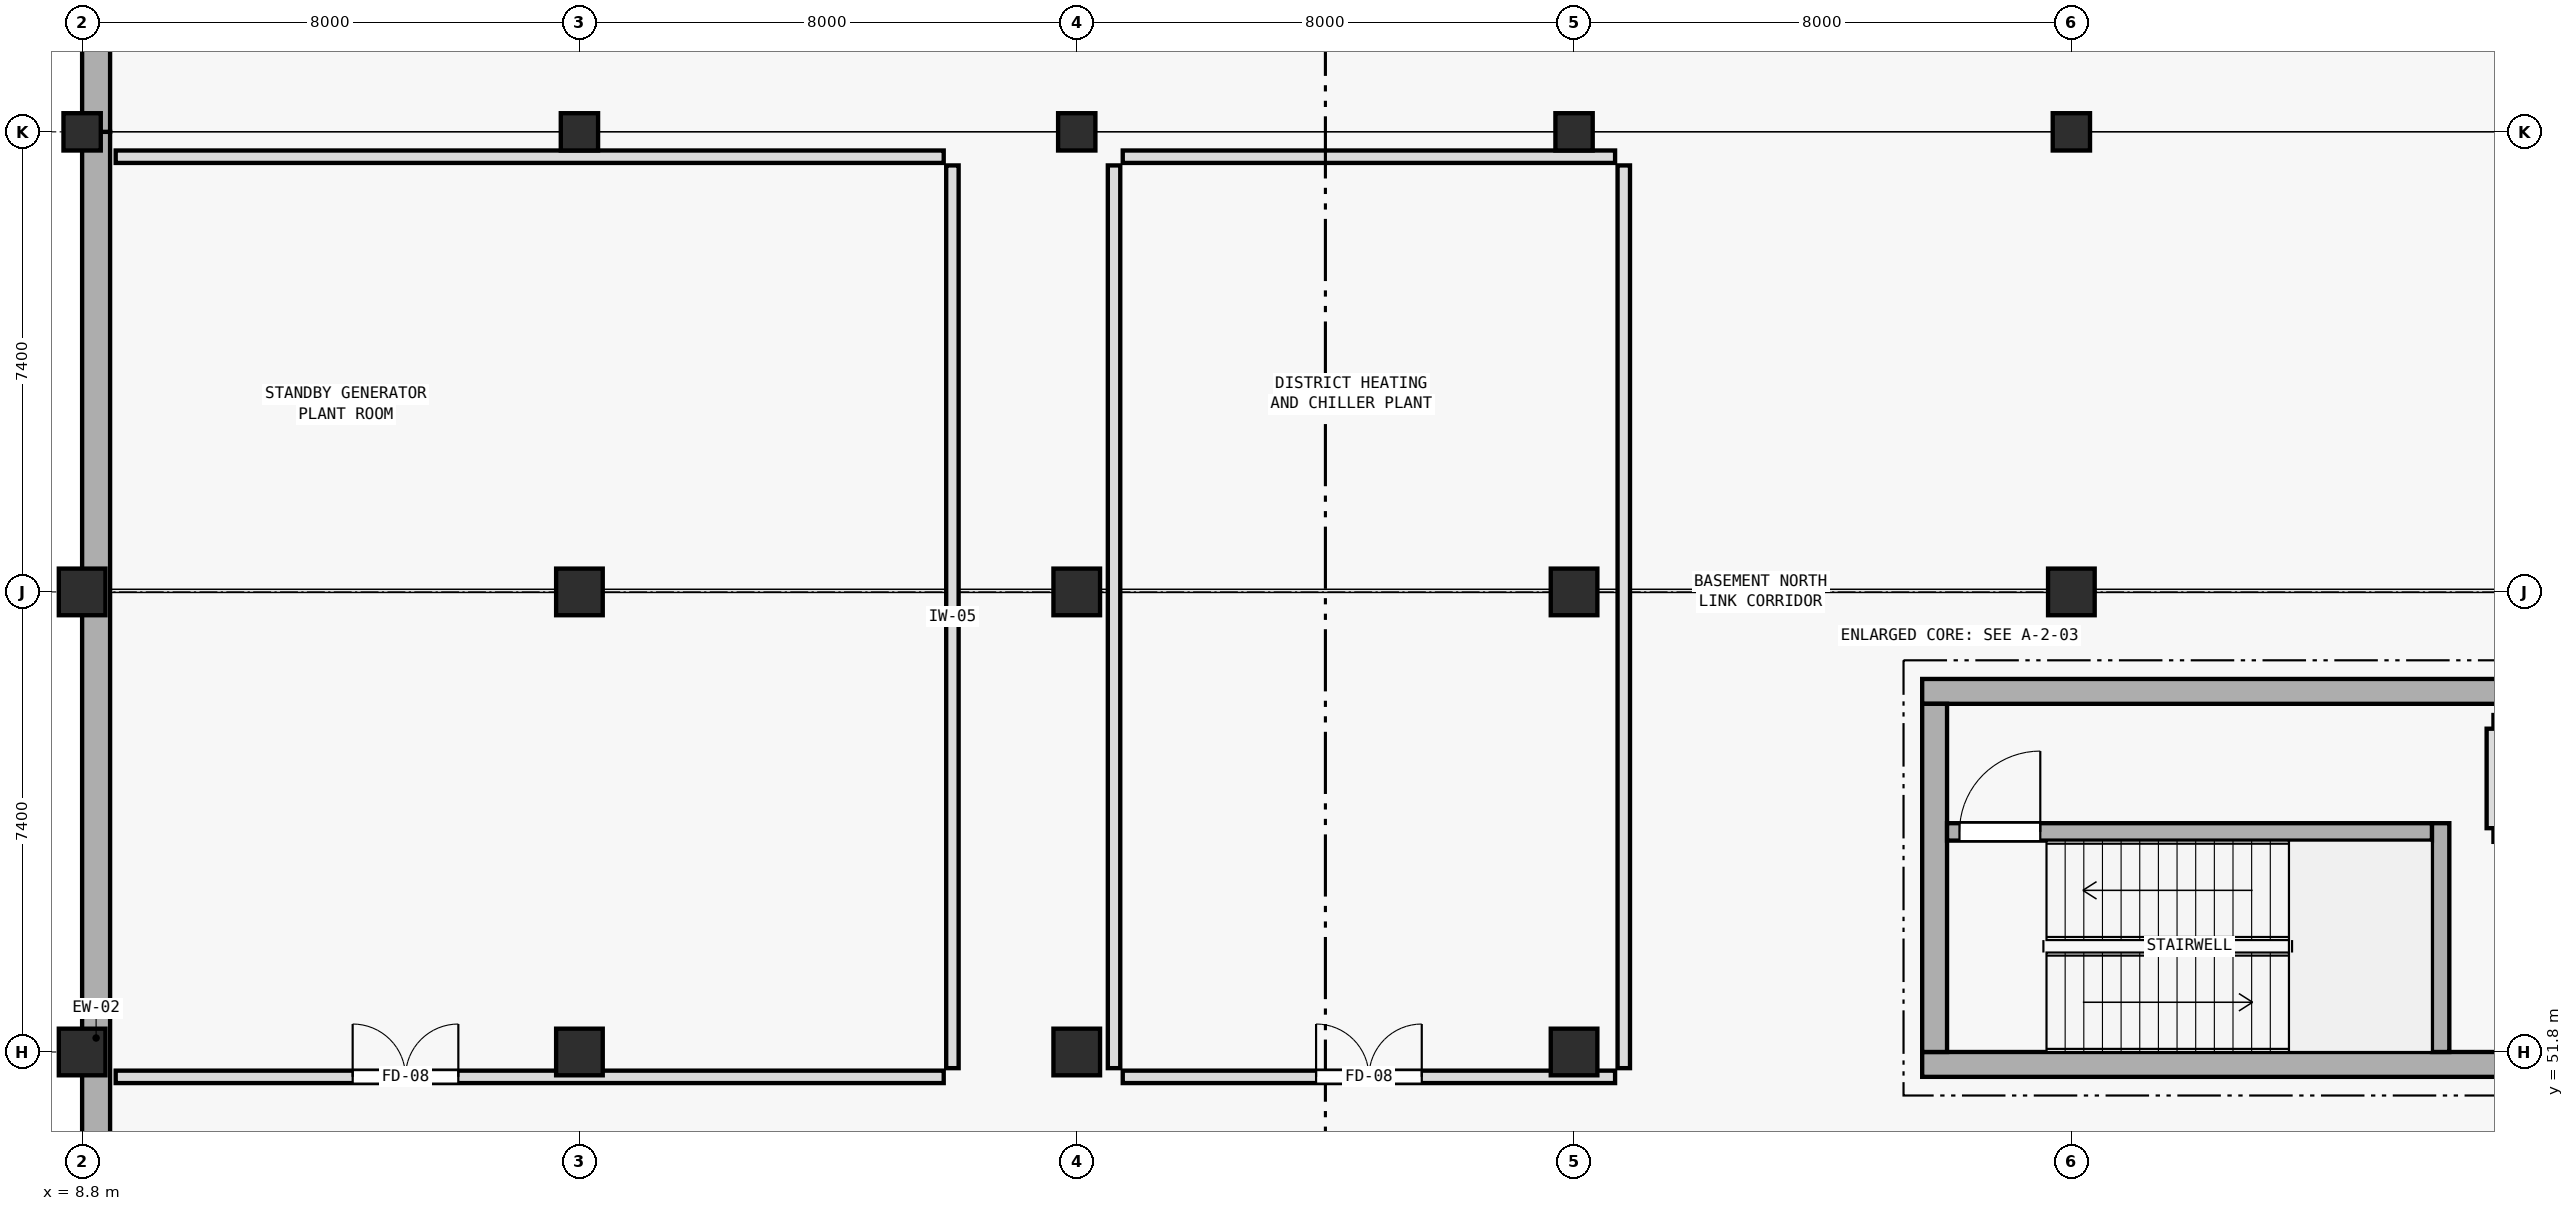
"""IFC4 building model, lengths in metres.
Left out: names, types, materials, properties, quantities, classifications, styles, units other than length and angle.
Written with IfcOpenShell. Run it as: python <this file> out.ifc"""

import sys

from ifc_helpers import new_model, si_unit, direction, frame, frame_2d, origin, origin_2d, place, context, subcontext, project, spatial, rectangle, extrude, element, fill, save


model = new_model("IFC4")
c1 = context("Model", 3, precision=1e-05, world=origin(), true_north=direction((0.0, 1.0)))
c2 = subcontext(c1, "Body", "Model", "MODEL_VIEW")
j1 = project(units=[si_unit("LENGTHUNIT", "METRE"), si_unit("PLANEANGLEUNIT", "RADIAN")], contexts=[c1])
p1 = place(None, origin())
s1 = spatial("IfcSite", under=j1, at=p1, CompositionType="ELEMENT")
p2 = place(p1, origin())
s2 = spatial("IfcBuilding", under=s1, at=p2, CompositionType="ELEMENT")
p3 = place(p2, frame((0.0, 0.0, -4.8)))
s3 = spatial("IfcBuildingStorey", under=s2, at=p3, CompositionType="ELEMENT", Elevation=-4.8)
p4 = place(p3, frame((38.4, 51.6, 0.0), z_axis=(0.0, 0.0, 1.0), x_axis=(1.0, 0.0, 0.0)))
e1 = element("IfcWall", 1, at=p4, inside=s3, PredefinedType="SHEAR", context=c2, shape_type="SweptSolid", body=[
    extrude(rectangle(XDim=15.2, YDim=0.4, at=frame_2d((7.6, 0.0))), origin(), (0.0, 0.0, 1.0), 4.795),
])
p5 = place(p4, frame((10.25, 0.0, 0.0)))
e2 = element("IfcOpeningElement", 2, at=p5, cuts=e1, PredefinedType="OPENING", context=c2, shape_type="SweptSolid", body=[
    extrude(rectangle(XDim=1.3, YDim=2.2, at=frame_2d((0.65, 1.1))), frame((0.0, 0.21, 0.0), z_axis=(0.0, -1.0, 0.0), x_axis=(1.0, 0.0, 0.0)), (0.0, 0.0, 1.0), 0.42),
])
p6 = place(p3, frame((38.4, 57.6, 0.0), z_axis=(0.0, 0.0, 1.0), x_axis=(1.0, 0.0, 0.0)))
e3 = element("IfcWall", 3, at=p6, inside=s3, PredefinedType="SHEAR", context=c2, shape_type="SweptSolid", body=[
    extrude(rectangle(XDim=15.2, YDim=0.4, at=frame_2d((7.6, 0.0))), origin(), (0.0, 0.0, 1.0), 4.795),
])
p7 = place(p3, frame((38.6, 51.8, 0.0), z_axis=(0.0, 0.0, 1.0), x_axis=(0.0, 1.0, 0.0)))
e4 = element("IfcWall", 4, at=p7, inside=s3, PredefinedType="SHEAR", context=c2, shape_type="SweptSolid", body=[
    extrude(rectangle(XDim=5.6, YDim=0.4, at=frame_2d((2.8, 0.0))), origin(), (0.0, 0.0, 1.0), 4.795),
])
p8 = place(p3, frame((46.74, 51.8, 0.0), z_axis=(0.0, 0.0, 1.0), x_axis=(0.0, 1.0, 0.0)))
e5 = element("IfcWall", 5, at=p8, inside=s3, PredefinedType="SHEAR", context=c2, shape_type="SweptSolid", body=[
    extrude(rectangle(XDim=3.68, YDim=0.28, at=frame_2d((1.84, 0.0))), origin(), (0.0, 0.0, 1.0), 4.795),
])
p9 = place(p3, frame((38.8, 55.34, 0.0), z_axis=(0.0, 0.0, 1.0), x_axis=(1.0, 0.0, 0.0)))
e6 = element("IfcWall", 6, at=p9, inside=s3, PredefinedType="SHEAR", context=c2, shape_type="SweptSolid", body=[
    extrude(rectangle(XDim=7.8, YDim=0.28, at=frame_2d((3.9, 0.0))), origin(), (0.0, 0.0, 1.0), 4.795),
])
p10 = place(p9, frame((0.2, 0.0, 0.0)))
e7 = element("IfcOpeningElement", 7, at=p10, cuts=e6, PredefinedType="OPENING", context=c2, shape_type="SweptSolid", body=[
    extrude(rectangle(XDim=1.3, YDim=2.2, at=frame_2d((0.65, 1.1))), frame((0.0, 0.15, 0.0), z_axis=(0.0, -1.0, 0.0), x_axis=(1.0, 0.0, 0.0)), (0.0, 0.0, 1.0), 0.3),
])
p11 = place(p3, frame((9.025, 37.45, 0.0), z_axis=(0.0, 0.0, 1.0), x_axis=(0.0, 1.0, 0.0)))
e8 = element("IfcWall", 8, at=p11, inside=s3, PredefinedType="SOLIDWALL", context=c2, shape_type="SweptSolid", body=[
    extrude(rectangle(XDim=29.15, YDim=0.45, at=frame_2d((14.575, 0.0))), origin(), (0.0, 0.0, 1.0), 4.38),
])
p12 = place(p3, frame((9.025, 66.6, 0.0), z_axis=(0.0, 0.0, 1.0), x_axis=(0.0, 1.0, 0.0)))
e9 = element("IfcWall", 9, at=p12, inside=s3, PredefinedType="SOLIDWALL", context=c2, shape_type="SweptSolid", body=[
    extrude(rectangle(XDim=44.4, YDim=0.45, at=frame_2d((22.2, 0.0))), origin(), (0.0, 0.0, 1.0), 4.38),
])
for number, where, z_axis, x_axis in (
    (10, (8.8, 51.8, 0.0), (0.0, 0.0, 1.0), (1.0, 0.0, 0.0)),
    (11, (8.8, 59.2, 0.0), (0.0, 0.0, 1.0), (1.0, 0.0, 0.0)),
):
    element("IfcColumn", number, at=place(p3, frame(where, z_axis=z_axis, x_axis=x_axis)), inside=s3, PredefinedType="COLUMN", context=c2, shape_type="SweptSolid", body=[
        extrude(rectangle(XDim=0.75, YDim=0.75, at=origin_2d()), origin(), (0.0, 0.0, 1.0), 4.8),
    ])
p13 = place(p3, frame((8.8, 66.6, 0.0), z_axis=(0.0, 0.0, 1.0), x_axis=(1.0, 0.0, 0.0)))
e12 = element("IfcColumn", 12, at=p13, inside=s3, PredefinedType="COLUMN", context=c2, shape_type="SweptSolid", body=[
    extrude(rectangle(XDim=0.6, YDim=0.6, at=origin_2d()), origin(), (0.0, 0.0, 1.0), 4.8),
])
for number, where, z_axis, x_axis in (
    (13, (16.8, 51.8, 0.0), (0.0, 0.0, 1.0), (1.0, 0.0, 0.0)),
    (14, (16.8, 59.2, 0.0), (0.0, 0.0, 1.0), (1.0, 0.0, 0.0)),
):
    element("IfcColumn", number, at=place(p3, frame(where, z_axis=z_axis, x_axis=x_axis)), inside=s3, PredefinedType="COLUMN", context=c2, shape_type="SweptSolid", body=[
        extrude(rectangle(XDim=0.75, YDim=0.75, at=origin_2d()), origin(), (0.0, 0.0, 1.0), 4.8),
    ])
p14 = place(p3, frame((16.8, 66.6, 0.0), z_axis=(0.0, 0.0, 1.0), x_axis=(1.0, 0.0, 0.0)))
e15 = element("IfcColumn", 15, at=p14, inside=s3, PredefinedType="COLUMN", context=c2, shape_type="SweptSolid", body=[
    extrude(rectangle(XDim=0.6, YDim=0.6, at=origin_2d()), origin(), (0.0, 0.0, 1.0), 4.8),
])
for number, where, z_axis, x_axis in (
    (16, (24.8, 51.8, 0.0), (0.0, 0.0, 1.0), (1.0, 0.0, 0.0)),
    (17, (24.8, 59.2, 0.0), (0.0, 0.0, 1.0), (1.0, 0.0, 0.0)),
):
    element("IfcColumn", number, at=place(p3, frame(where, z_axis=z_axis, x_axis=x_axis)), inside=s3, PredefinedType="COLUMN", context=c2, shape_type="SweptSolid", body=[
        extrude(rectangle(XDim=0.75, YDim=0.75, at=origin_2d()), origin(), (0.0, 0.0, 1.0), 4.8),
    ])
p15 = place(p3, frame((24.8, 66.6, 0.0), z_axis=(0.0, 0.0, 1.0), x_axis=(1.0, 0.0, 0.0)))
e18 = element("IfcColumn", 18, at=p15, inside=s3, PredefinedType="COLUMN", context=c2, shape_type="SweptSolid", body=[
    extrude(rectangle(XDim=0.6, YDim=0.6, at=origin_2d()), origin(), (0.0, 0.0, 1.0), 4.8),
])
for number, where, z_axis, x_axis in (
    (19, (32.8, 51.8, 0.0), (0.0, 0.0, 1.0), (1.0, 0.0, 0.0)),
    (20, (32.8, 59.2, 0.0), (0.0, 0.0, 1.0), (1.0, 0.0, 0.0)),
):
    element("IfcColumn", number, at=place(p3, frame(where, z_axis=z_axis, x_axis=x_axis)), inside=s3, PredefinedType="COLUMN", context=c2, shape_type="SweptSolid", body=[
        extrude(rectangle(XDim=0.75, YDim=0.75, at=origin_2d()), origin(), (0.0, 0.0, 1.0), 4.8),
    ])
p16 = place(p3, frame((32.8, 66.6, 0.0), z_axis=(0.0, 0.0, 1.0), x_axis=(1.0, 0.0, 0.0)))
e21 = element("IfcColumn", 21, at=p16, inside=s3, PredefinedType="COLUMN", context=c2, shape_type="SweptSolid", body=[
    extrude(rectangle(XDim=0.6, YDim=0.6, at=origin_2d()), origin(), (0.0, 0.0, 1.0), 4.8),
])
p17 = place(p3, frame((40.8, 59.2, 0.0), z_axis=(0.0, 0.0, 1.0), x_axis=(1.0, 0.0, 0.0)))
e22 = element("IfcColumn", 22, at=p17, inside=s3, PredefinedType="COLUMN", context=c2, shape_type="SweptSolid", body=[
    extrude(rectangle(XDim=0.75, YDim=0.75, at=origin_2d()), origin(), (0.0, 0.0, 1.0), 4.8),
])
p18 = place(p3, frame((40.8, 66.6, 0.0), z_axis=(0.0, 0.0, 1.0), x_axis=(1.0, 0.0, 0.0)))
e23 = element("IfcColumn", 23, at=p18, inside=s3, PredefinedType="COLUMN", context=c2, shape_type="SweptSolid", body=[
    extrude(rectangle(XDim=0.6, YDim=0.6, at=origin_2d()), origin(), (0.0, 0.0, 1.0), 4.8),
])
p19 = place(p3, frame((47.59, 55.29, 0.0), z_axis=(0.0, 0.0, 1.0), x_axis=(1.0, 0.0, 0.0)))
e24 = element("IfcWall", 24, at=p19, inside=s3, PredefinedType="PLUMBINGWALL", context=c2, shape_type="SweptSolid", body=[
    extrude(rectangle(XDim=1.62, YDim=0.22, at=frame_2d((0.81, 0.0))), origin(), (0.0, 0.0, 1.0), 4.38),
])
p20 = place(p19, frame((0.31, 0.0, 0.0)))
e25 = element("IfcOpeningElement", 25, at=p20, cuts=e24, PredefinedType="OPENING", context=c2, shape_type="SweptSolid", body=[
    extrude(rectangle(XDim=1.0, YDim=2.2, at=frame_2d((0.5, 1.1))), frame((0.0, 0.12, 0.0), z_axis=(0.0, -1.0, 0.0), x_axis=(1.0, 0.0, 0.0)), (0.0, 0.0, 1.0), 0.24),
])
p21 = place(p3, frame((47.59, 57.11, 0.0), z_axis=(0.0, 0.0, 1.0), x_axis=(1.0, 0.0, 0.0)))
e26 = element("IfcWall", 26, at=p21, inside=s3, PredefinedType="PLUMBINGWALL", context=c2, shape_type="SweptSolid", body=[
    extrude(rectangle(XDim=1.62, YDim=0.22, at=frame_2d((0.81, 0.0))), origin(), (0.0, 0.0, 1.0), 4.38),
])
p22 = place(p3, frame((47.59, 55.4, 0.0), z_axis=(0.0, 0.0, 1.0), x_axis=(0.0, 1.0, 0.0)))
e27 = element("IfcWall", 27, at=p22, inside=s3, PredefinedType="PLUMBINGWALL", context=c2, shape_type="SweptSolid", body=[
    extrude(rectangle(XDim=1.6, YDim=0.22, at=frame_2d((0.8, 0.0))), origin(), (0.0, 0.0, 1.0), 4.38),
])
p23 = place(p3, frame((9.34, 51.4, 0.0), z_axis=(0.0, 0.0, 1.0), x_axis=(1.0, 0.0, 0.0)))
e28 = element("IfcWall", 28, at=p23, inside=s3, PredefinedType="STANDARD", context=c2, shape_type="SweptSolid", body=[
    extrude(rectangle(XDim=13.32, YDim=0.2, at=frame_2d((6.66, 0.0))), origin(), (0.0, 0.0, 1.0), 3.67),
])
p24 = place(p23, frame((3.812, 0.0, 0.0)))
e29 = element("IfcOpeningElement", 29, at=p24, cuts=e28, PredefinedType="OPENING", context=c2, shape_type="SweptSolid", body=[
    extrude(rectangle(XDim=1.7, YDim=2.4, at=frame_2d((0.85, 1.2))), frame((0.0, 0.11, 0.0), z_axis=(0.0, -1.0, 0.0), x_axis=(1.0, 0.0, 0.0)), (0.0, 0.0, 1.0), 0.22),
])
p25 = place(p3, frame((9.34, 66.2, 0.0), z_axis=(0.0, 0.0, 1.0), x_axis=(1.0, 0.0, 0.0)))
e30 = element("IfcWall", 30, at=p25, inside=s3, PredefinedType="STANDARD", context=c2, shape_type="SweptSolid", body=[
    extrude(rectangle(XDim=13.32, YDim=0.2, at=frame_2d((6.66, 0.0))), origin(), (0.0, 0.0, 1.0), 4.38),
])
p26 = place(p3, frame((22.8, 51.54, 0.0), z_axis=(0.0, 0.0, 1.0), x_axis=(0.0, 1.0, 0.0)))
e31 = element("IfcWall", 31, at=p26, inside=s3, PredefinedType="STANDARD", context=c2, shape_type="SweptSolid", body=[
    extrude(rectangle(XDim=14.52, YDim=0.2, at=frame_2d((7.26, 0.0))), origin(), (0.0, 0.0, 1.0), 3.67),
])
p27 = place(p3, frame((25.54, 51.4, 0.0), z_axis=(0.0, 0.0, 1.0), x_axis=(1.0, 0.0, 0.0)))
e32 = element("IfcWall", 32, at=p27, inside=s3, PredefinedType="STANDARD", context=c2, shape_type="SweptSolid", body=[
    extrude(rectangle(XDim=7.92, YDim=0.2, at=frame_2d((3.96, 0.0))), origin(), (0.0, 0.0, 1.0), 3.67),
])
p28 = place(p27, frame((3.11, 0.0, 0.0)))
e33 = element("IfcOpeningElement", 33, at=p28, cuts=e32, PredefinedType="OPENING", context=c2, shape_type="SweptSolid", body=[
    extrude(rectangle(XDim=1.7, YDim=2.4, at=frame_2d((0.85, 1.2))), frame((0.0, 0.11, 0.0), z_axis=(0.0, -1.0, 0.0), x_axis=(1.0, 0.0, 0.0)), (0.0, 0.0, 1.0), 0.22),
])
p29 = place(p3, frame((25.54, 66.2, 0.0), z_axis=(0.0, 0.0, 1.0), x_axis=(1.0, 0.0, 0.0)))
e34 = element("IfcWall", 34, at=p29, inside=s3, PredefinedType="STANDARD", context=c2, shape_type="SweptSolid", body=[
    extrude(rectangle(XDim=7.92, YDim=0.2, at=frame_2d((3.96, 0.0))), origin(), (0.0, 0.0, 1.0), 3.63),
])
for number, where, z_axis, x_axis in (
    (35, (25.4, 51.54, 0.0), (0.0, 0.0, 1.0), (0.0, 1.0, 0.0)),
    (36, (33.6, 51.54, 0.0), (0.0, 0.0, 1.0), (0.0, 1.0, 0.0)),
):
    element("IfcWall", number, at=place(p3, frame(where, z_axis=z_axis, x_axis=x_axis)), inside=s3, PredefinedType="STANDARD", context=c2, shape_type="SweptSolid", body=[
        extrude(rectangle(XDim=14.52, YDim=0.2, at=frame_2d((7.26, 0.0))), origin(), (0.0, 0.0, 1.0), 3.63),
    ])
p30 = place(p10, origin())
e37 = element("IfcDoor", 37, at=p30, inside=s3, OperationType="SINGLE_SWING_RIGHT", PredefinedType="DOOR", context=c2, shape_type="SweptSolid", body=[
    extrude(rectangle(XDim=1.3, YDim=2.2, at=frame_2d((0.65, 1.1))), frame((0.0, 0.025, 0.0), z_axis=(0.0, -1.0, 0.0), x_axis=(1.0, 0.0, 0.0)), (0.0, 0.0, 1.0), 0.05),
])
fill(e7, e37)
p31 = place(p24, origin())
e38 = element("IfcDoor", 38, at=p31, inside=s3, OperationType="DOUBLE_DOOR_SINGLE_SWING", PredefinedType="DOOR", context=c2, shape_type="SweptSolid", body=[
    extrude(rectangle(XDim=1.7, YDim=2.4, at=frame_2d((0.85, 1.2))), frame((0.0, 0.025, 0.0), z_axis=(0.0, -1.0, 0.0), x_axis=(1.0, 0.0, 0.0)), (0.0, 0.0, 1.0), 0.05),
])
fill(e29, e38)
p32 = place(p28, origin())
e39 = element("IfcDoor", 39, at=p32, inside=s3, OperationType="DOUBLE_DOOR_SINGLE_SWING", PredefinedType="DOOR", context=c2, shape_type="SweptSolid", body=[
    extrude(rectangle(XDim=1.7, YDim=2.4, at=frame_2d((0.85, 1.2))), frame((0.0, 0.025, 0.0), z_axis=(0.0, -1.0, 0.0), x_axis=(1.0, 0.0, 0.0)), (0.0, 0.0, 1.0), 0.05),
])
fill(e33, e39)
save(model, sys.argv[1])
